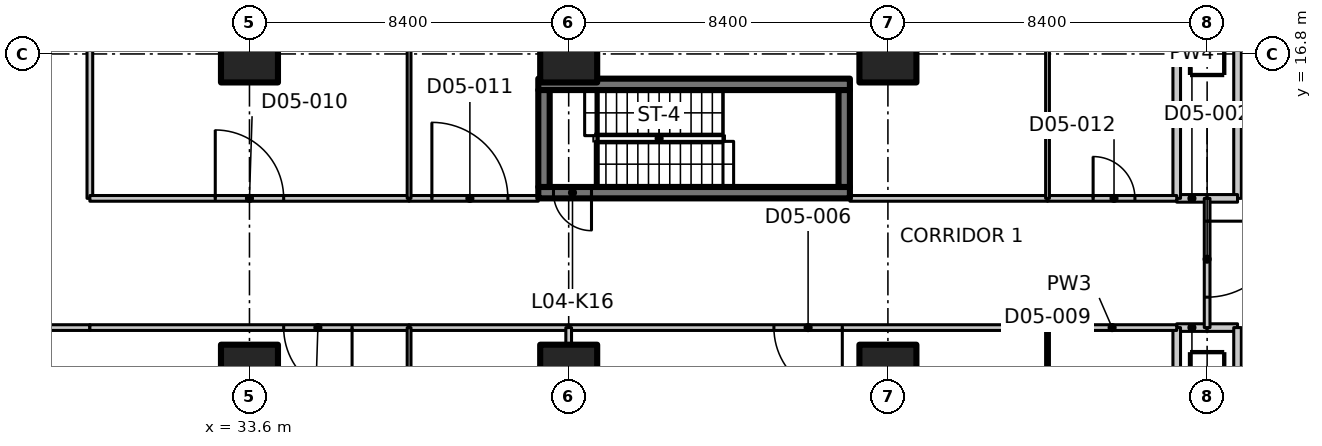
"""IFC4 building model, lengths in metres.
Left out: names, types, materials, properties, quantities, classifications, styles, units other than length and angle.
Written with IfcOpenShell. Run it as: python <this file> out.ifc"""

import sys

from ifc_helpers import new_model, si_unit, direction, frame, frame_2d, origin, origin_2d, place, context, subcontext, project, spatial, polyline, rectangle, outline, extrude, element, fill, save


model = new_model("IFC4")
c1 = context("Model", 3, precision=1e-05, world=origin(), true_north=direction((0.0, 1.0)))
c2 = subcontext(c1, "Body", "Model", "MODEL_VIEW")
j1 = project(units=[si_unit("LENGTHUNIT", "METRE"), si_unit("PLANEANGLEUNIT", "RADIAN")], contexts=[c1])
p1 = place(None, origin())
s1 = spatial("IfcSite", under=j1, at=p1, CompositionType="ELEMENT")
p2 = place(p1, origin())
s2 = spatial("IfcBuilding", under=s1, at=p2, CompositionType="ELEMENT")
p3 = place(p2, frame((0.0, 0.0, 27.5)))
s3 = spatial("IfcBuildingStorey", under=s2, at=p3, CompositionType="ELEMENT", Elevation=27.5)
for number, where, z_axis, x_axis in (
    (1, (33.6, 8.4, 0.0), (0.0, 0.0, 1.0), (1.0, 0.0, 0.0)),
    (2, (33.6, 16.8, 0.0), (0.0, 0.0, 1.0), (1.0, 0.0, 0.0)),
    (3, (42.0, 8.4, 0.0), (0.0, 0.0, 1.0), (1.0, 0.0, 0.0)),
    (4, (42.0, 16.8, 0.0), (0.0, 0.0, 1.0), (1.0, 0.0, 0.0)),
    (5, (50.4, 8.4, 0.0), (0.0, 0.0, 1.0), (1.0, 0.0, 0.0)),
    (6, (50.4, 16.8, 0.0), (0.0, 0.0, 1.0), (1.0, 0.0, 0.0)),
):
    element("IfcColumn", number, at=place(p3, frame(where, z_axis=z_axis, x_axis=x_axis)), inside=s3, PredefinedType="COLUMN", context=c2, shape_type="SweptSolid", body=[
        extrude(rectangle(XDim=1.5, YDim=1.5, at=origin_2d()), origin(), (0.0, 0.0, 1.0), 4.25),
    ])
p4 = place(p3, frame((49.4, 13.15, 0.0), z_axis=(0.0, 0.0, 1.0), x_axis=(-1.0, 0.0, 0.0)))
e7 = element("IfcWall", 7, at=p4, inside=s3, PredefinedType="SHEAR", context=c2, shape_type="SweptSolid", body=[
    extrude(rectangle(XDim=8.2, YDim=0.3, at=frame_2d((4.1, 0.0))), origin(), (0.0, 0.0, 1.0), 4.25),
])
p5 = place(p4, frame((6.8, 0.0, 0.0)))
e8 = element("IfcOpeningElement", 8, at=p5, cuts=e7, PredefinedType="OPENING", context=c2, shape_type="SweptSolid", body=[
    extrude(rectangle(XDim=1.0, YDim=2.1, at=frame_2d((0.5, 1.05))), frame((0.0, 0.16, 0.0), z_axis=(0.0, -1.0, 0.0), x_axis=(1.0, 0.0, 0.0)), (0.0, 0.0, 1.0), 0.32),
])
p6 = place(p3, frame((41.2, 16.0, 0.0), z_axis=(0.0, 0.0, 1.0), x_axis=(1.0, 0.0, 0.0)))
e9 = element("IfcWall", 9, at=p6, inside=s3, PredefinedType="SHEAR", context=c2, shape_type="SweptSolid", body=[
    extrude(rectangle(XDim=8.2, YDim=0.3, at=frame_2d((4.1, 0.0))), origin(), (0.0, 0.0, 1.0), 4.25),
])
for number, where, z_axis, x_axis in (
    (10, (41.35, 13.3, 0.0), (0.0, 0.0, 1.0), (0.0, 1.0, 0.0)),
    (11, (49.25, 13.3, 0.0), (0.0, 0.0, 1.0), (0.0, 1.0, 0.0)),
):
    element("IfcWall", number, at=place(p3, frame(where, z_axis=z_axis, x_axis=x_axis)), inside=s3, PredefinedType="SHEAR", context=c2, shape_type="SweptSolid", body=[
        extrude(rectangle(XDim=2.55, YDim=0.3, at=frame_2d((1.275, 0.0))), origin(), (0.0, 0.0, 1.0), 4.25),
    ])
for number, where, z_axis, x_axis in (
    (12, (58.0, 9.6, 0.0), (0.0, 0.0, 1.0), (1.0, 0.0, 0.0)),
    (13, (58.8, 9.6, 0.0), (0.0, 0.0, 1.0), (1.0, 0.0, 0.0)),
):
    element("IfcWall", number, at=place(p3, frame(where, z_axis=z_axis, x_axis=x_axis)), inside=s3, PredefinedType="PARTITIONING", context=c2, shape_type="SweptSolid", body=[
        extrude(rectangle(XDim=0.8, YDim=0.2, at=frame_2d((0.4, 0.0))), origin(), (0.0, 0.0, 1.0), 4.23),
    ])
p7 = place(p3, frame((59.6, 9.6, 0.0), z_axis=(0.0, 0.0, 1.0), x_axis=(0.0, -1.0, 0.0)))
e14 = element("IfcWall", 14, at=p7, inside=s3, PredefinedType="PARTITIONING", context=c2, shape_type="SweptSolid", body=[
    extrude(outline(polyline([(0.0, 0.0), (8.83, 0.0), (8.83, 3.88), (8.086, 3.88), (8.084, 4.23), (0.0, 4.23), (0.0, 0.0)])), frame((0.0, 0.1, 0.0), z_axis=(0.0, -1.0, 0.0), x_axis=(1.0, 0.0, 0.0)), (0.0, 0.0, 1.0), 0.2),
])
p8 = place(p3, frame((58.0, 6.0, 0.0), z_axis=(0.0, 0.0, 1.0), x_axis=(0.0, 1.0, 0.0)))
e15 = element("IfcWall", 15, at=p8, inside=s3, PredefinedType="PARTITIONING", context=c2, shape_type="SweptSolid", body=[
    extrude(rectangle(XDim=3.6, YDim=0.2, at=frame_2d((1.8, 0.0))), origin(), (0.0, 0.0, 1.0), 4.23),
])
p9 = place(p3, frame((58.8, 13.0, 0.0), z_axis=(0.0, 0.0, 1.0), x_axis=(-1.0, 0.0, 0.0)))
e16 = element("IfcWall", 16, at=p9, inside=s3, PredefinedType="PARTITIONING", context=c2, shape_type="SweptSolid", body=[
    extrude(rectangle(XDim=0.8, YDim=0.2, at=frame_2d((0.4, 0.0))), origin(), (0.0, 0.0, 1.0), 4.23),
])
p10 = place(p3, frame((59.6, 24.43, 0.0), z_axis=(0.0, 0.0, 1.0), x_axis=(0.0, -1.0, 0.0)))
e17 = element("IfcWall", 17, at=p10, inside=s3, PredefinedType="PARTITIONING", context=c2, shape_type="SweptSolid", body=[
    extrude(outline(polyline([(0.0, 0.0), (11.43, 0.0), (11.43, 4.23), (0.746, 4.23), (0.744, 3.88), (0.0, 3.88), (0.0, 0.0)])), frame((0.0, 0.1, 0.0), z_axis=(0.0, -1.0, 0.0), x_axis=(1.0, 0.0, 0.0)), (0.0, 0.0, 1.0), 0.2),
])
p11 = place(p3, frame((59.6, 13.0, 0.0), z_axis=(0.0, 0.0, 1.0), x_axis=(-1.0, 0.0, 0.0)))
e18 = element("IfcWall", 18, at=p11, inside=s3, PredefinedType="PARTITIONING", context=c2, shape_type="SweptSolid", body=[
    extrude(rectangle(XDim=0.8, YDim=0.2, at=frame_2d((0.4, 0.0))), origin(), (0.0, 0.0, 1.0), 4.23),
])
p12 = place(p3, frame((58.0, 13.0, 0.0), z_axis=(0.0, 0.0, 1.0), x_axis=(0.0, 1.0, 0.0)))
e19 = element("IfcWall", 19, at=p12, inside=s3, PredefinedType="PARTITIONING", context=c2, shape_type="SweptSolid", body=[
    extrude(rectangle(XDim=11.43, YDim=0.2, at=frame_2d((5.715, 0.0))), origin(), (0.0, 0.0, 1.0), 4.23),
])
p13 = place(p3, frame((29.4, 9.6, 0.0), z_axis=(0.0, 0.0, 1.0), x_axis=(-1.0, 0.0, 0.0)))
e20 = element("IfcWall", 20, at=p13, inside=s3, PredefinedType="PARTITIONING", context=c2, shape_type="SweptSolid", body=[
    extrude(rectangle(XDim=4.2, YDim=0.15, at=frame_2d((2.1, 0.0))), origin(), (0.0, 0.0, 1.0), 4.23),
])
p14 = place(p3, frame((29.4, 21.2, 0.0), z_axis=(0.0, 0.0, 1.0), x_axis=(0.0, -1.0, 0.0)))
e21 = element("IfcWall", 21, at=p14, inside=s3, PredefinedType="PARTITIONING", context=c2, shape_type="SweptSolid", body=[
    extrude(rectangle(XDim=8.2, YDim=0.15, at=frame_2d((4.1, 0.0))), origin(), (0.0, 0.0, 1.0), 4.23),
])
p15 = place(p3, frame((58.8, 13.0, 0.0), z_axis=(0.0, 0.0, 1.0), x_axis=(0.0, -1.0, 0.0)))
e22 = element("IfcWall", 22, at=p15, inside=s3, PredefinedType="PARTITIONING", context=c2, shape_type="SweptSolid", body=[
    extrude(rectangle(XDim=3.4, YDim=0.15, at=frame_2d((1.7, 0.0))), origin(), (0.0, 0.0, 1.0), 4.23),
])
p16 = place(p15, frame((0.6, 0.0, 0.0)))
e23 = element("IfcOpeningElement", 23, at=p16, cuts=e22, PredefinedType="OPENING", context=c2, shape_type="SweptSolid", body=[
    extrude(rectangle(XDim=2.0, YDim=2.4, at=frame_2d((1.0, 1.2))), frame((0.0, 0.085, 0.0), z_axis=(0.0, -1.0, 0.0), x_axis=(1.0, 0.0, 0.0)), (0.0, 0.0, 1.0), 0.17),
])
p17 = place(p3, frame((37.8, 9.6, 0.0), z_axis=(0.0, 0.0, 1.0), x_axis=(-1.0, 0.0, 0.0)))
e24 = element("IfcWall", 24, at=p17, inside=s3, PredefinedType="PARTITIONING", context=c2, shape_type="SweptSolid", body=[
    extrude(rectangle(XDim=8.4, YDim=0.15, at=frame_2d((4.2, 0.0))), origin(), (0.0, 0.0, 1.0), 4.23),
])
p18 = place(p17, frame((1.5, 0.0, 0.0)))
e25 = element("IfcOpeningElement", 25, at=p18, cuts=e24, PredefinedType="OPENING", context=c2, shape_type="SweptSolid", body=[
    extrude(rectangle(XDim=1.8, YDim=2.1, at=frame_2d((0.9, 1.05))), frame((0.0, 0.085, 0.0), z_axis=(0.0, -1.0, 0.0), x_axis=(1.0, 0.0, 0.0)), (0.0, 0.0, 1.0), 0.17),
])
p19 = place(p3, frame((42.0, 9.6, 0.0), z_axis=(0.0, 0.0, 1.0), x_axis=(-1.0, 0.0, 0.0)))
e26 = element("IfcWall", 26, at=p19, inside=s3, PredefinedType="PARTITIONING", context=c2, shape_type="SweptSolid", body=[
    extrude(rectangle(XDim=4.2, YDim=0.15, at=frame_2d((2.1, 0.0))), origin(), (0.0, 0.0, 1.0), 4.23),
])
p20 = place(p3, frame((54.6, 9.6, 0.0), z_axis=(0.0, 0.0, 1.0), x_axis=(-1.0, 0.0, 0.0)))
e27 = element("IfcWall", 27, at=p20, inside=s3, PredefinedType="PARTITIONING", context=c2, shape_type="SweptSolid", body=[
    extrude(rectangle(XDim=12.6, YDim=0.15, at=frame_2d((6.3, 0.0))), origin(), (0.0, 0.0, 1.0), 4.23),
])
p21 = place(p20, frame((5.4, 0.0, 0.0)))
e28 = element("IfcOpeningElement", 28, at=p21, cuts=e27, PredefinedType="OPENING", context=c2, shape_type="SweptSolid", body=[
    extrude(rectangle(XDim=1.8, YDim=2.1, at=frame_2d((0.9, 1.05))), frame((0.0, 0.085, 0.0), z_axis=(0.0, -1.0, 0.0), x_axis=(1.0, 0.0, 0.0)), (0.0, 0.0, 1.0), 0.17),
])
p22 = place(p3, frame((58.0, 9.6, 0.0), z_axis=(0.0, 0.0, 1.0), x_axis=(-1.0, 0.0, 0.0)))
e29 = element("IfcWall", 29, at=p22, inside=s3, PredefinedType="PARTITIONING", context=c2, shape_type="SweptSolid", body=[
    extrude(rectangle(XDim=3.4, YDim=0.15, at=frame_2d((1.7, 0.0))), origin(), (0.0, 0.0, 1.0), 4.23),
])
p23 = place(p3, frame((29.4, 13.0, 0.0), z_axis=(0.0, 0.0, 1.0), x_axis=(1.0, 0.0, 0.0)))
e30 = element("IfcWall", 30, at=p23, inside=s3, PredefinedType="PARTITIONING", context=c2, shape_type="SweptSolid", body=[
    extrude(rectangle(XDim=8.4, YDim=0.15, at=frame_2d((4.2, 0.0))), origin(), (0.0, 0.0, 1.0), 4.23),
])
p24 = place(p23, frame((3.3, 0.0, 0.0)))
e31 = element("IfcOpeningElement", 31, at=p24, cuts=e30, PredefinedType="OPENING", context=c2, shape_type="SweptSolid", body=[
    extrude(rectangle(XDim=1.8, YDim=2.1, at=frame_2d((0.9, 1.05))), frame((0.0, 0.085, 0.0), z_axis=(0.0, -1.0, 0.0), x_axis=(1.0, 0.0, 0.0)), (0.0, 0.0, 1.0), 0.17),
])
p25 = place(p3, frame((37.8, 13.0, 0.0), z_axis=(0.0, 0.0, 1.0), x_axis=(1.0, 0.0, 0.0)))
e32 = element("IfcWall", 32, at=p25, inside=s3, PredefinedType="PARTITIONING", context=c2, shape_type="SweptSolid", body=[
    extrude(rectangle(XDim=3.4, YDim=0.15, at=frame_2d((1.7, 0.0))), origin(), (0.0, 0.0, 1.0), 4.23),
])
p26 = place(p25, frame((0.6, 0.0, 0.0)))
e33 = element("IfcOpeningElement", 33, at=p26, cuts=e32, PredefinedType="OPENING", context=c2, shape_type="SweptSolid", body=[
    extrude(rectangle(XDim=2.0, YDim=2.4, at=frame_2d((1.0, 1.2))), frame((0.0, 0.085, 0.0), z_axis=(0.0, -1.0, 0.0), x_axis=(1.0, 0.0, 0.0)), (0.0, 0.0, 1.0), 0.17),
])
p27 = place(p3, frame((49.4, 13.0, 0.0), z_axis=(0.0, 0.0, 1.0), x_axis=(1.0, 0.0, 0.0)))
e34 = element("IfcWall", 34, at=p27, inside=s3, PredefinedType="PARTITIONING", context=c2, shape_type="SweptSolid", body=[
    extrude(rectangle(XDim=5.2, YDim=0.15, at=frame_2d((2.6, 0.0))), origin(), (0.0, 0.0, 1.0), 4.23),
])
p28 = place(p3, frame((54.6, 13.0, 0.0), z_axis=(0.0, 0.0, 1.0), x_axis=(1.0, 0.0, 0.0)))
e35 = element("IfcWall", 35, at=p28, inside=s3, PredefinedType="PARTITIONING", context=c2, shape_type="SweptSolid", body=[
    extrude(rectangle(XDim=3.4, YDim=0.15, at=frame_2d((1.7, 0.0))), origin(), (0.0, 0.0, 1.0), 4.23),
])
p29 = place(p28, frame((1.2, 0.0, 0.0)))
e36 = element("IfcOpeningElement", 36, at=p29, cuts=e35, PredefinedType="OPENING", context=c2, shape_type="SweptSolid", body=[
    extrude(rectangle(XDim=1.1, YDim=2.1, at=frame_2d((0.55, 1.05))), frame((0.0, 0.085, 0.0), z_axis=(0.0, -1.0, 0.0), x_axis=(1.0, 0.0, 0.0)), (0.0, 0.0, 1.0), 0.17),
])
p30 = place(p3, frame((37.8, 9.6, 0.0), z_axis=(0.0, 0.0, 1.0), x_axis=(0.0, -1.0, 0.0)))
e37 = element("IfcWall", 37, at=p30, inside=s3, PredefinedType="PARTITIONING", context=c2, shape_type="SweptSolid", body=[
    extrude(rectangle(XDim=7.8, YDim=0.1, at=frame_2d((3.9, 0.0))), origin(), (0.0, 0.0, 1.0), 4.23),
])
p31 = place(p30, frame((3.3, 0.0, 0.0)))
e38 = element("IfcOpeningElement", 38, at=p31, cuts=e37, PredefinedType="OPENING", context=c2, shape_type="SweptSolid", body=[
    extrude(rectangle(XDim=1.0, YDim=2.1, at=frame_2d((0.5, 1.05))), frame((0.0, 0.06, 0.0), z_axis=(0.0, -1.0, 0.0), x_axis=(1.0, 0.0, 0.0)), (0.0, 0.0, 1.0), 0.12),
])
p32 = place(p3, frame((42.0, 9.6, 0.0), z_axis=(0.0, 0.0, 1.0), x_axis=(0.0, -1.0, 0.0)))
e39 = element("IfcWall", 39, at=p32, inside=s3, PredefinedType="PARTITIONING", context=c2, shape_type="SweptSolid", body=[
    extrude(rectangle(XDim=0.43, YDim=0.15, at=frame_2d((0.215, 0.0))), origin(), (0.0, 0.0, 1.0), 4.23),
])
p33 = place(p3, frame((54.6, 9.6, 0.0), z_axis=(0.0, 0.0, 1.0), x_axis=(0.0, -1.0, 0.0)))
e40 = element("IfcWall", 40, at=p33, inside=s3, PredefinedType="PARTITIONING", context=c2, shape_type="SweptSolid", body=[
    extrude(rectangle(XDim=3.6, YDim=0.1, at=frame_2d((1.8, 0.0))), origin(), (0.0, 0.0, 1.0), 4.23),
])
p34 = place(p33, frame((1.5, 0.0, 0.0)))
e41 = element("IfcOpeningElement", 41, at=p34, cuts=e40, PredefinedType="OPENING", context=c2, shape_type="SweptSolid", body=[
    extrude(rectangle(XDim=0.9, YDim=2.1, at=frame_2d((0.45, 1.05))), frame((0.0, 0.06, 0.0), z_axis=(0.0, -1.0, 0.0), x_axis=(1.0, 0.0, 0.0)), (0.0, 0.0, 1.0), 0.12),
])
p35 = place(p3, frame((37.8, 29.857, 0.0), z_axis=(0.0, 0.0, 1.0), x_axis=(0.0, -1.0, 0.0)))
e42 = element("IfcWall", 42, at=p35, inside=s3, PredefinedType="PARTITIONING", context=c2, shape_type="SweptSolid", body=[
    extrude(outline(polyline([(0.0, 0.0), (16.857, 0.0), (16.857, 4.23), (5.107, 4.23), (5.105, 3.88), (4.209, 3.88), (4.207, 4.23), (0.0, 4.23), (0.0, 0.0)])), frame((0.0, 0.05, 0.0), z_axis=(0.0, -1.0, 0.0), x_axis=(1.0, 0.0, 0.0)), (0.0, 0.0, 1.0), 0.1),
])
p36 = place(p3, frame((54.6, 25.998, 0.0), z_axis=(0.0, 0.0, 1.0), x_axis=(0.0, -1.0, 0.0)))
e43 = element("IfcWall", 43, at=p36, inside=s3, PredefinedType="PARTITIONING", context=c2, shape_type="SweptSolid", body=[
    extrude(outline(polyline([(0.0, 0.0), (12.998, 0.0), (12.998, 4.23), (1.248, 4.23), (1.246, 3.88), (0.35, 3.88), (0.348, 4.23), (0.0, 4.23), (0.0, 0.0)])), frame((0.0, 0.05, 0.0), z_axis=(0.0, -1.0, 0.0), x_axis=(1.0, 0.0, 0.0)), (0.0, 0.0, 1.0), 0.1),
])
p37 = place(p5, origin())
e44 = element("IfcDoor", 44, at=p37, inside=s3, OperationType="SINGLE_SWING_RIGHT", PredefinedType="DOOR", context=c2, shape_type="SweptSolid", body=[
    extrude(rectangle(XDim=1.0, YDim=2.1, at=frame_2d((0.5, 1.05))), frame((0.0, 0.025, 0.0), z_axis=(0.0, -1.0, 0.0), x_axis=(1.0, 0.0, 0.0)), (0.0, 0.0, 1.0), 0.05),
])
fill(e8, e44)
p38 = place(p16, origin())
e45 = element("IfcDoor", 45, at=p38, inside=s3, OperationType="DOUBLE_DOOR_SINGLE_SWING", PredefinedType="DOOR", context=c2, shape_type="SweptSolid", body=[
    extrude(rectangle(XDim=2.0, YDim=2.4, at=frame_2d((1.0, 1.2))), frame((0.0, 0.025, 0.0), z_axis=(0.0, -1.0, 0.0), x_axis=(1.0, 0.0, 0.0)), (0.0, 0.0, 1.0), 0.05),
])
fill(e23, e45)
p39 = place(p18, origin())
e46 = element("IfcDoor", 46, at=p39, inside=s3, OperationType="DOUBLE_DOOR_SINGLE_SWING", PredefinedType="DOOR", context=c2, shape_type="SweptSolid", body=[
    extrude(rectangle(XDim=1.8, YDim=2.1, at=frame_2d((0.9, 1.05))), frame((0.0, 0.025, 0.0), z_axis=(0.0, -1.0, 0.0), x_axis=(1.0, 0.0, 0.0)), (0.0, 0.0, 1.0), 0.05),
])
fill(e25, e46)
p40 = place(p21, origin())
e47 = element("IfcDoor", 47, at=p40, inside=s3, OperationType="DOUBLE_DOOR_SINGLE_SWING", PredefinedType="DOOR", context=c2, shape_type="SweptSolid", body=[
    extrude(rectangle(XDim=1.8, YDim=2.1, at=frame_2d((0.9, 1.05))), frame((0.0, 0.025, 0.0), z_axis=(0.0, -1.0, 0.0), x_axis=(1.0, 0.0, 0.0)), (0.0, 0.0, 1.0), 0.05),
])
fill(e28, e47)
p41 = place(p24, origin())
e48 = element("IfcDoor", 48, at=p41, inside=s3, OperationType="DOUBLE_DOOR_SINGLE_SWING", PredefinedType="DOOR", context=c2, shape_type="SweptSolid", body=[
    extrude(rectangle(XDim=1.8, YDim=2.1, at=frame_2d((0.9, 1.05))), frame((0.0, 0.025, 0.0), z_axis=(0.0, -1.0, 0.0), x_axis=(1.0, 0.0, 0.0)), (0.0, 0.0, 1.0), 0.05),
])
fill(e31, e48)
p42 = place(p26, origin())
e49 = element("IfcDoor", 49, at=p42, inside=s3, OperationType="DOUBLE_DOOR_SINGLE_SWING", PredefinedType="DOOR", context=c2, shape_type="SweptSolid", body=[
    extrude(rectangle(XDim=2.0, YDim=2.4, at=frame_2d((1.0, 1.2))), frame((0.0, 0.025, 0.0), z_axis=(0.0, -1.0, 0.0), x_axis=(1.0, 0.0, 0.0)), (0.0, 0.0, 1.0), 0.05),
])
fill(e33, e49)
p43 = place(p29, origin())
e50 = element("IfcDoor", 50, at=p43, inside=s3, OperationType="SINGLE_SWING_LEFT", PredefinedType="DOOR", context=c2, shape_type="SweptSolid", body=[
    extrude(rectangle(XDim=1.1, YDim=2.1, at=frame_2d((0.55, 1.05))), frame((0.0, 0.025, 0.0), z_axis=(0.0, -1.0, 0.0), x_axis=(1.0, 0.0, 0.0)), (0.0, 0.0, 1.0), 0.05),
])
fill(e36, e50)
save(model, sys.argv[1])
